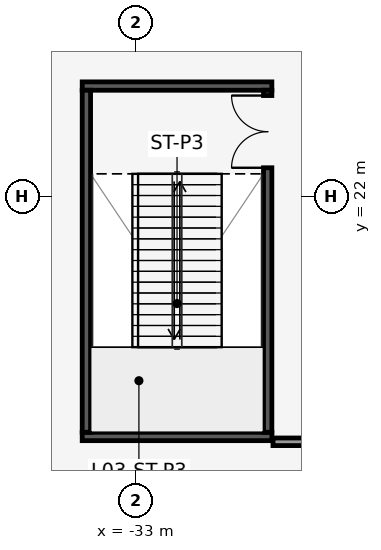
"""IFC4 building model, lengths in metres.
Left out: names, types, materials, properties, quantities, classifications, styles, units other than length and angle.
Written with IfcOpenShell. Run it as: python <this file> out.ifc"""

import sys

from ifc_helpers import new_model, si_unit, direction, frame, frame_2d, origin, place, context, subcontext, project, spatial, rectangle, extrude, element, fill, save


model = new_model("IFC4")
c1 = context("Model", 3, precision=1e-05, world=origin(), true_north=direction((0.0, 1.0)))
c2 = subcontext(c1, "Body", "Model", "MODEL_VIEW")
j1 = project(units=[si_unit("LENGTHUNIT", "METRE"), si_unit("PLANEANGLEUNIT", "RADIAN")], contexts=[c1])
p1 = place(None, origin())
s1 = spatial("IfcSite", under=j1, at=p1, CompositionType="ELEMENT")
p2 = place(p1, origin())
s2 = spatial("IfcBuilding", under=s1, at=p2, CompositionType="ELEMENT")
p3 = place(p2, frame((0.0, 0.0, 17.5)))
s3 = spatial("IfcBuildingStorey", under=s2, at=p3, CompositionType="ELEMENT", Elevation=17.5)
for number, where, z_axis, x_axis in (
    (1, (-34.42, 15.69, 0.0), (0.0, 0.0, 1.0), (1.0, 0.0, 0.0)),
    (2, (-34.42, 24.91, 0.0), (0.0, 0.0, 1.0), (1.0, 0.0, 0.0)),
):
    element("IfcWall", number, at=place(p3, frame(where, z_axis=z_axis, x_axis=x_axis)), inside=s3, PredefinedType="SHEAR", context=c2, shape_type="SweptSolid", body=[
        extrude(rectangle(XDim=4.99, YDim=0.22, at=frame_2d((2.495, 0.0))), origin(), (0.0, 0.0, 1.0), 5.7),
    ])
p4 = place(p3, frame((-34.31, 15.8, 0.0), z_axis=(0.0, 0.0, 1.0), x_axis=(0.0, 1.0, 0.0)))
e3 = element("IfcWall", 3, at=p4, inside=s3, PredefinedType="SHEAR", context=c2, shape_type="SweptSolid", body=[
    extrude(rectangle(XDim=9.0, YDim=0.22, at=frame_2d((4.5, 0.0))), origin(), (0.0, 0.0, 1.0), 5.7),
])
p5 = place(p3, frame((-29.54, 15.8, 0.0), z_axis=(0.0, 0.0, 1.0), x_axis=(0.0, 1.0, 0.0)))
e4 = element("IfcWall", 4, at=p5, inside=s3, PredefinedType="SHEAR", context=c2, shape_type="SweptSolid", body=[
    extrude(rectangle(XDim=9.0, YDim=0.22, at=frame_2d((4.5, 0.0))), origin(), (0.0, 0.0, 1.0), 5.7),
])
p6 = place(p5, frame((6.96, 0.0, 0.0)))
e5 = element("IfcOpeningElement", 5, at=p6, cuts=e4, PredefinedType="OPENING", context=c2, shape_type="SweptSolid", body=[
    extrude(rectangle(XDim=1.9, YDim=2.2, at=frame_2d((0.95, 1.1))), frame((0.0, 0.12, 0.0), z_axis=(0.0, -1.0, 0.0), x_axis=(1.0, 0.0, 0.0)), (0.0, 0.0, 1.0), 0.24),
])
p7 = place(p3, frame((-29.4, 15.55, 0.0), z_axis=(0.0, 0.0, 1.0), x_axis=(1.0, 0.0, 0.0)))
e6 = element("IfcWall", 6, at=p7, inside=s3, PredefinedType="PARTITIONING", context=c2, shape_type="SweptSolid", body=[
    extrude(rectangle(XDim=18.75, YDim=0.2, at=frame_2d((9.375, 0.0))), origin(), (0.0, 0.0, 1.0), 5.7),
])
p8 = place(p7, frame((8.475, 0.0, 0.0)))
e7 = element("IfcOpeningElement", 7, at=p8, cuts=e6, PredefinedType="OPENING", context=c2, shape_type="SweptSolid", body=[
    extrude(rectangle(XDim=1.8, YDim=2.2, at=frame_2d((0.9, 1.1))), frame((0.0, 0.11, 0.0), z_axis=(0.0, -1.0, 0.0), x_axis=(1.0, 0.0, 0.0)), (0.0, 0.0, 1.0), 0.22),
])
p9 = place(p6, origin())
e8 = element("IfcDoor", 8, at=p9, inside=s3, OperationType="DOUBLE_DOOR_SINGLE_SWING", PredefinedType="DOOR", context=c2, shape_type="SweptSolid", body=[
    extrude(rectangle(XDim=1.9, YDim=2.2, at=frame_2d((0.95, 1.1))), frame((0.0, 0.025, 0.0), z_axis=(0.0, -1.0, 0.0), x_axis=(1.0, 0.0, 0.0)), (0.0, 0.0, 1.0), 0.05),
])
fill(e5, e8)
save(model, sys.argv[1])
